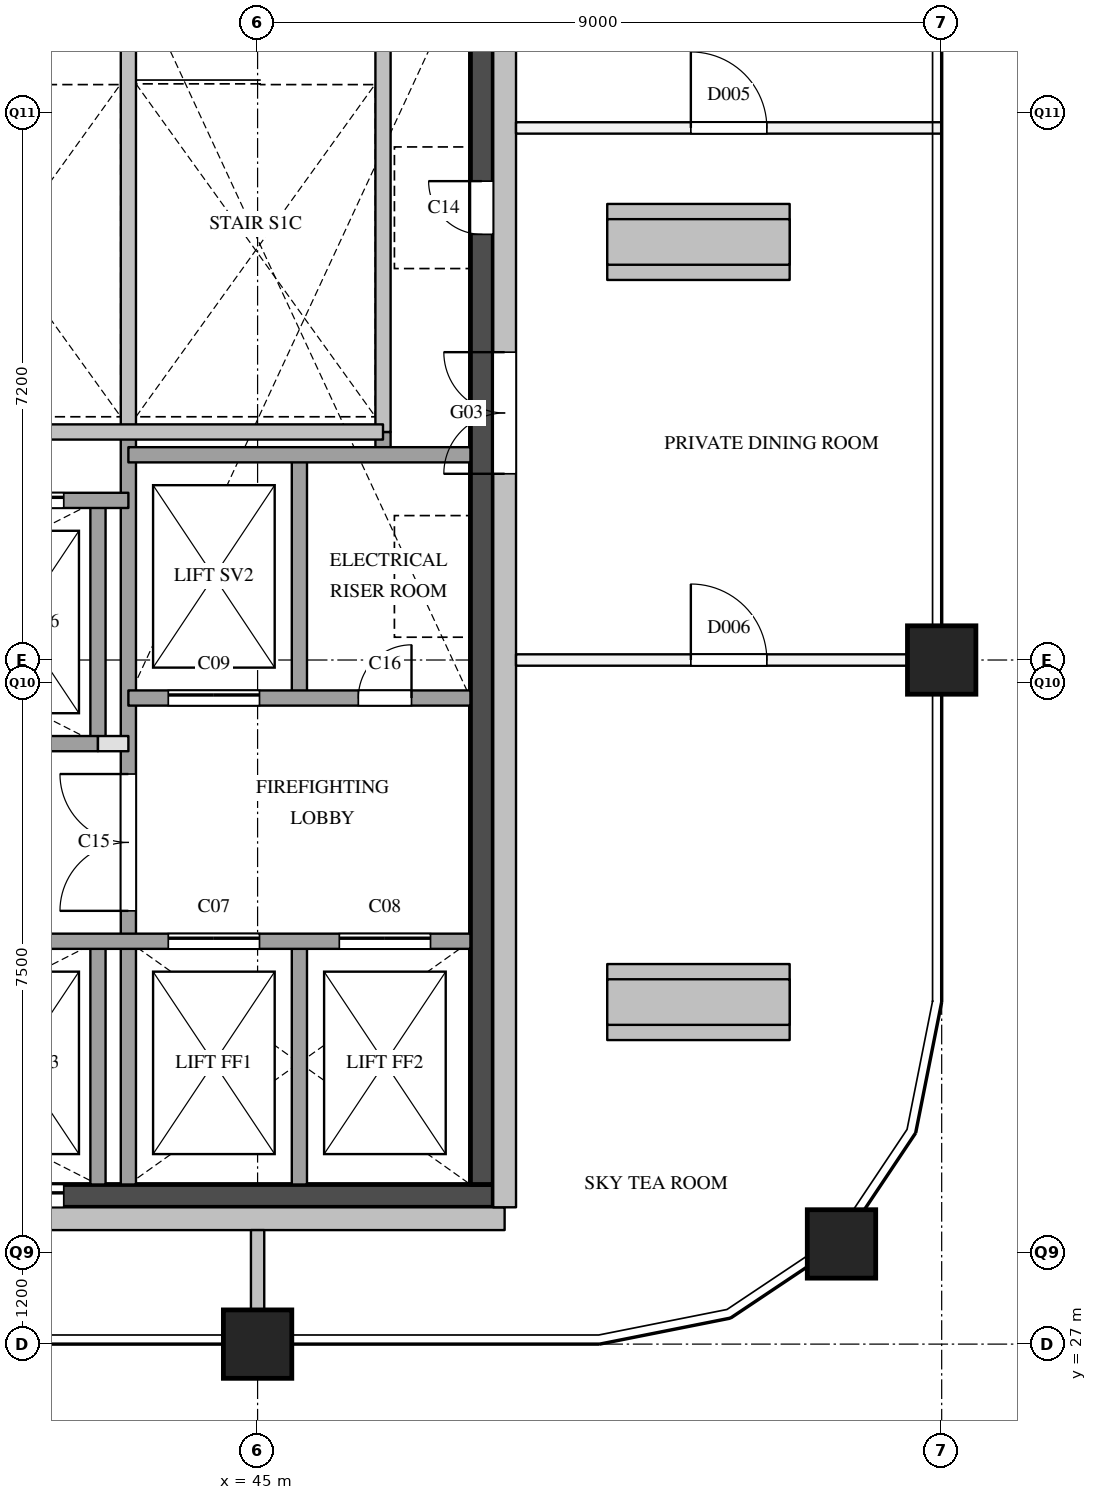
"""IFC4 building model, lengths in metres.
Left out: names, types, materials, properties, quantities, classifications, styles, units other than length and angle.
Written with IfcOpenShell. Run it as: python <this file> out.ifc"""

import sys

from ifc_helpers import new_model, si_unit, direction, frame, frame_2d, origin, origin_2d, place, context, subcontext, project, spatial, rectangle, extrude, element, fill, save


model = new_model("IFC4")
c1 = context("Model", 3, precision=1e-05, world=origin(), true_north=direction((0.0, 1.0)))
c2 = subcontext(c1, "Body", "Model", "MODEL_VIEW")
j1 = project(units=[si_unit("LENGTHUNIT", "METRE"), si_unit("PLANEANGLEUNIT", "RADIAN")], contexts=[c1])
p1 = place(None, origin())
s1 = spatial("IfcSite", under=j1, at=p1, CompositionType="ELEMENT")
p2 = place(p1, origin())
s2 = spatial("IfcBuilding", under=s1, at=p2, CompositionType="ELEMENT")
p3 = place(p2, frame((0.0, 0.0, 320.7)))
s3 = spatial("IfcBuildingStorey", under=s2, at=p3, CompositionType="ELEMENT", Elevation=320.7)
for number, where, z_axis, x_axis in (
    (1, (45.0, 27.0, 0.0), (0.0, 0.0, 1.0), (1.0, 0.0, 0.0)),
    (2, (52.682, 28.318, 0.0), (0.0, 0.0, 1.0), (1.0, 0.0, 0.0)),
    (3, (54.0, 36.0, 0.0), (0.0, 0.0, 1.0), (1.0, 0.0, 0.0)),
):
    element("IfcColumn", number, at=place(p3, frame(where, z_axis=z_axis, x_axis=x_axis)), inside=s3, PredefinedType="COLUMN", context=c2, shape_type="SweptSolid", body=[
        extrude(rectangle(XDim=0.9, YDim=0.9, at=origin_2d()), origin(), (0.0, 0.0, 1.0), 4.5),
    ])
p4 = place(p3, frame((49.6, 31.5, 4.5), z_axis=(0.0, 0.0, 1.0), x_axis=(1.0, 0.0, 0.0)))
e4 = element("IfcWall", 4, at=p4, inside=s3, PredefinedType="SOLIDWALL", context=c2, shape_type="SweptSolid", body=[
    extrude(rectangle(XDim=2.4, YDim=1.0, at=frame_2d((1.2, 0.0))), origin(), (0.0, 0.0, 1.0), 0.45),
])
p5 = place(p3, frame((49.6, 41.5, 4.5), z_axis=(0.0, 0.0, 1.0), x_axis=(1.0, 0.0, 0.0)))
e5 = element("IfcWall", 5, at=p5, inside=s3, PredefinedType="SOLIDWALL", context=c2, shape_type="SweptSolid", body=[
    extrude(rectangle(XDim=2.4, YDim=1.0, at=frame_2d((1.2, 0.0))), origin(), (0.0, 0.0, 1.0), 1.35),
])
p6 = place(p3, frame((36.15, 28.65, 4.5), z_axis=(0.0, 0.0, 1.0), x_axis=(1.0, 0.0, 0.0)))
e6 = element("IfcWall", 6, at=p6, inside=s3, PredefinedType="SOLIDWALL", context=c2, shape_type="SweptSolid", body=[
    extrude(rectangle(XDim=12.1, YDim=0.3, at=frame_2d((6.05, 0.0))), origin(), (0.0, 0.0, 1.0), 3.6),
])
p7 = place(p3, frame((48.25, 28.8, 4.5), z_axis=(0.0, 0.0, 1.0), x_axis=(0.0, 1.0, 0.0)))
e7 = element("IfcWall", 7, at=p7, inside=s3, PredefinedType="SOLIDWALL", context=c2, shape_type="SweptSolid", body=[
    extrude(rectangle(XDim=20.9, YDim=0.3, at=frame_2d((10.45, 0.0))), origin(), (0.0, 0.0, 1.0), 3.6),
])
p8 = place(p7, frame((9.65, 0.0, 0.0)))
e8 = element("IfcOpeningElement", 8, at=p8, cuts=e7, PredefinedType="OPENING", context=c2, shape_type="SweptSolid", body=[
    extrude(rectangle(XDim=1.6, YDim=2.4, at=frame_2d((0.8, 1.2))), frame((0.0, 0.16, 0.0), z_axis=(0.0, -1.0, 0.0), x_axis=(1.0, 0.0, 0.0)), (0.0, 0.0, 1.0), 0.32),
])
for number, where, z_axis, x_axis in (
    (9, (49.6, 31.5, 4.95), (0.0, 0.0, 1.0), (1.0, 0.0, 0.0)),
    (10, (49.6, 41.5, 5.85), (0.0, 0.0, 1.0), (1.0, 0.0, 0.0)),
):
    element("IfcWall", number, at=place(p3, frame(where, z_axis=z_axis, x_axis=x_axis)), inside=s3, PredefinedType="SOLIDWALL", context=c2, shape_type="SweptSolid", body=[
        extrude(rectangle(XDim=2.4, YDim=0.6, at=frame_2d((1.2, 0.0))), origin(), (0.0, 0.0, 1.0), 0.75),
    ])
p9 = place(p3, frame((36.3, 28.95, 0.0), z_axis=(0.0, 0.0, 1.0), x_axis=(1.0, 0.0, 0.0)))
e11 = element("IfcWall", 11, at=p9, inside=s3, PredefinedType="SHEAR", context=c2, shape_type="SweptSolid", body=[
    extrude(rectangle(XDim=11.8, YDim=0.3, at=frame_2d((5.9, 0.0))), origin(), (0.0, 0.0, 1.0), 3.95),
])
p10 = place(p9, frame((0.75, 0.0, 0.0)))
e12 = element("IfcOpeningElement", 12, at=p10, cuts=e11, PredefinedType="OPENING", context=c2, shape_type="SweptSolid", body=[
    extrude(rectangle(XDim=1.2, YDim=2.1, at=frame_2d((0.6, 1.05))), frame((0.0, 0.16, 0.0), z_axis=(0.0, -1.0, 0.0), x_axis=(1.0, 0.0, 0.0)), (0.0, 0.0, 1.0), 0.32),
])
p11 = place(p9, frame((2.85, 0.0, 0.0)))
e13 = element("IfcOpeningElement", 13, at=p11, cuts=e11, PredefinedType="OPENING", context=c2, shape_type="SweptSolid", body=[
    extrude(rectangle(XDim=1.2, YDim=2.1, at=frame_2d((0.6, 1.05))), frame((0.0, 0.16, 0.0), z_axis=(0.0, -1.0, 0.0), x_axis=(1.0, 0.0, 0.0)), (0.0, 0.0, 1.0), 0.32),
])
p12 = place(p9, frame((4.95, 0.0, 0.0)))
e14 = element("IfcOpeningElement", 14, at=p12, cuts=e11, PredefinedType="OPENING", context=c2, shape_type="SweptSolid", body=[
    extrude(rectangle(XDim=1.2, YDim=2.1, at=frame_2d((0.6, 1.05))), frame((0.0, 0.16, 0.0), z_axis=(0.0, -1.0, 0.0), x_axis=(1.0, 0.0, 0.0)), (0.0, 0.0, 1.0), 0.32),
])
p13 = place(p3, frame((47.95, 29.1, 0.0), z_axis=(0.0, 0.0, 1.0), x_axis=(0.0, 1.0, 0.0)))
e15 = element("IfcWall", 15, at=p13, inside=s3, PredefinedType="SHEAR", context=c2, shape_type="SweptSolid", body=[
    extrude(rectangle(XDim=20.3, YDim=0.3, at=frame_2d((10.15, 0.0))), origin(), (0.0, 0.0, 1.0), 3.95),
])
p14 = place(p13, frame((12.5, 0.0, 0.0)))
e16 = element("IfcOpeningElement", 16, at=p14, cuts=e15, PredefinedType="OPENING", context=c2, shape_type="SweptSolid", body=[
    extrude(rectangle(XDim=0.7, YDim=2.1, at=frame_2d((0.35, 1.05))), frame((0.0, 0.16, 0.0), z_axis=(0.0, -1.0, 0.0), x_axis=(1.0, 0.0, 0.0)), (0.0, 0.0, 1.0), 0.32),
])
p15 = place(p3, frame((42.9, 29.1, 0.0), z_axis=(0.0, 0.0, 1.0), x_axis=(0.0, 1.0, 0.0)))
e17 = element("IfcWall", 17, at=p15, inside=s3, PredefinedType="SOLIDWALL", context=c2, shape_type="SweptSolid", body=[
    extrude(rectangle(XDim=3.2, YDim=0.2, at=frame_2d((1.6, 0.0))), origin(), (0.0, 0.0, 1.0), 3.95),
])
p16 = place(p3, frame((42.9, 34.9, 0.0), z_axis=(0.0, 0.0, 1.0), x_axis=(0.0, 1.0, 0.0)))
e18 = element("IfcWall", 18, at=p16, inside=s3, PredefinedType="SOLIDWALL", context=c2, shape_type="SweptSolid", body=[
    extrude(rectangle(XDim=3.2, YDim=0.2, at=frame_2d((1.6, 0.0))), origin(), (0.0, 0.0, 1.0), 3.95),
])
p17 = place(p3, frame((43.3, 29.1, 0.0), z_axis=(0.0, 0.0, 1.0), x_axis=(0.0, 1.0, 0.0)))
e19 = element("IfcWall", 19, at=p17, inside=s3, PredefinedType="SOLIDWALL", context=c2, shape_type="SweptSolid", body=[
    extrude(rectangle(XDim=9.9, YDim=0.2, at=frame_2d((4.95, 0.0))), origin(), (0.0, 0.0, 1.0), 3.95),
])
p18 = place(p17, frame((3.6, 0.0, 0.0)))
e20 = element("IfcOpeningElement", 20, at=p18, cuts=e19, PredefinedType="OPENING", context=c2, shape_type="SweptSolid", body=[
    extrude(rectangle(XDim=1.8, YDim=2.1, at=frame_2d((0.9, 1.05))), frame((0.0, 0.11, 0.0), z_axis=(0.0, -1.0, 0.0), x_axis=(1.0, 0.0, 0.0)), (0.0, 0.0, 1.0), 0.22),
])
p19 = place(p3, frame((43.3, 39.0, 0.0), z_axis=(0.0, 0.0, 1.0), x_axis=(0.0, 1.0, 0.0)))
e21 = element("IfcWall", 21, at=p19, inside=s3, PredefinedType="SOLIDWALL", context=c2, shape_type="SweptSolid", body=[
    extrude(rectangle(XDim=6.2, YDim=0.2, at=frame_2d((3.1, 0.0))), origin(), (0.0, 0.0, 1.0), 3.95),
])
for number, where, z_axis, x_axis in (
    (22, (45.55, 29.1, 0.0), (0.0, 0.0, 1.0), (0.0, 1.0, 0.0)),
    (23, (45.55, 35.5, 0.0), (0.0, 0.0, 1.0), (0.0, 1.0, 0.0)),
):
    element("IfcWall", number, at=place(p3, frame(where, z_axis=z_axis, x_axis=x_axis)), inside=s3, PredefinedType="SOLIDWALL", context=c2, shape_type="SweptSolid", body=[
        extrude(rectangle(XDim=3.2, YDim=0.2, at=frame_2d((1.6, 0.0))), origin(), (0.0, 0.0, 1.0), 3.95),
    ])
p20 = place(p3, frame((46.65, 38.7, 0.0), z_axis=(0.0, 0.0, 1.0), x_axis=(0.0, 1.0, 0.0)))
e24 = element("IfcWall", 24, at=p20, inside=s3, PredefinedType="SOLIDWALL", context=c2, shape_type="SweptSolid", body=[
    extrude(rectangle(XDim=0.3, YDim=0.2, at=frame_2d((0.15, 0.0))), origin(), (0.0, 0.0, 1.0), 3.95),
])
p21 = place(p3, frame((46.65, 39.0, 0.0), z_axis=(0.0, 0.0, 1.0), x_axis=(0.0, 1.0, 0.0)))
e25 = element("IfcWall", 25, at=p21, inside=s3, PredefinedType="SOLIDWALL", context=c2, shape_type="SweptSolid", body=[
    extrude(rectangle(XDim=6.2, YDim=0.2, at=frame_2d((3.1, 0.0))), origin(), (0.0, 0.0, 1.0), 3.95),
])
p22 = place(p3, frame((36.6, 32.3, 0.0), z_axis=(0.0, 0.0, 1.0), x_axis=(1.0, 0.0, 0.0)))
e26 = element("IfcWall", 26, at=p22, inside=s3, PredefinedType="SOLIDWALL", context=c2, shape_type="SweptSolid", body=[
    extrude(rectangle(XDim=11.2, YDim=0.2, at=frame_2d((5.6, 0.0))), origin(), (0.0, 0.0, 1.0), 3.95),
])
p23 = place(p22, frame((7.225, 0.0, 0.0)))
e27 = element("IfcOpeningElement", 27, at=p23, cuts=e26, PredefinedType="OPENING", context=c2, shape_type="SweptSolid", body=[
    extrude(rectangle(XDim=1.2, YDim=2.1, at=frame_2d((0.6, 1.05))), frame((0.0, 0.11, 0.0), z_axis=(0.0, -1.0, 0.0), x_axis=(1.0, 0.0, 0.0)), (0.0, 0.0, 1.0), 0.22),
])
p24 = place(p22, frame((9.475, 0.0, 0.0)))
e28 = element("IfcOpeningElement", 28, at=p24, cuts=e26, PredefinedType="OPENING", context=c2, shape_type="SweptSolid", body=[
    extrude(rectangle(XDim=1.2, YDim=2.1, at=frame_2d((0.6, 1.05))), frame((0.0, 0.11, 0.0), z_axis=(0.0, -1.0, 0.0), x_axis=(1.0, 0.0, 0.0)), (0.0, 0.0, 1.0), 0.22),
])
p25 = place(p3, frame((42.9, 34.9, 0.0), z_axis=(0.0, 0.0, 1.0), x_axis=(1.0, 0.0, 0.0)))
e29 = element("IfcWall", 29, at=p25, inside=s3, PredefinedType="PARTITIONING", context=c2, shape_type="SweptSolid", body=[
    extrude(rectangle(XDim=0.4, YDim=0.2, at=frame_2d((0.2, 0.0))), origin(), (0.0, 0.0, 1.0), 3.95),
])
p26 = place(p3, frame((36.6, 34.9, 0.0), z_axis=(0.0, 0.0, 1.0), x_axis=(1.0, 0.0, 0.0)))
e30 = element("IfcWall", 30, at=p26, inside=s3, PredefinedType="SOLIDWALL", context=c2, shape_type="SweptSolid", body=[
    extrude(rectangle(XDim=6.3, YDim=0.2, at=frame_2d((3.15, 0.0))), origin(), (0.0, 0.0, 1.0), 3.95),
])
p27 = place(p3, frame((43.3, 35.5, 0.0), z_axis=(0.0, 0.0, 1.0), x_axis=(1.0, 0.0, 0.0)))
e31 = element("IfcWall", 31, at=p27, inside=s3, PredefinedType="SOLIDWALL", context=c2, shape_type="SweptSolid", body=[
    extrude(rectangle(XDim=4.5, YDim=0.2, at=frame_2d((2.25, 0.0))), origin(), (0.0, 0.0, 1.0), 3.95),
])
p28 = place(p27, frame((0.525, 0.0, 0.0)))
e32 = element("IfcOpeningElement", 32, at=p28, cuts=e31, PredefinedType="OPENING", context=c2, shape_type="SweptSolid", body=[
    extrude(rectangle(XDim=1.2, YDim=2.1, at=frame_2d((0.6, 1.05))), frame((0.0, 0.11, 0.0), z_axis=(0.0, -1.0, 0.0), x_axis=(1.0, 0.0, 0.0)), (0.0, 0.0, 1.0), 0.22),
])
p29 = place(p27, frame((3.025, 0.0, 0.0)))
e33 = element("IfcOpeningElement", 33, at=p29, cuts=e31, PredefinedType="OPENING", context=c2, shape_type="SweptSolid", body=[
    extrude(rectangle(XDim=0.7, YDim=2.1, at=frame_2d((0.35, 1.05))), frame((0.0, 0.11, 0.0), z_axis=(0.0, -1.0, 0.0), x_axis=(1.0, 0.0, 0.0)), (0.0, 0.0, 1.0), 0.22),
])
p30 = place(p3, frame((36.6, 38.1, 0.0), z_axis=(0.0, 0.0, 1.0), x_axis=(1.0, 0.0, 0.0)))
e34 = element("IfcWall", 34, at=p30, inside=s3, PredefinedType="SOLIDWALL", context=c2, shape_type="SweptSolid", body=[
    extrude(rectangle(XDim=6.7, YDim=0.2, at=frame_2d((3.35, 0.0))), origin(), (0.0, 0.0, 1.0), 3.95),
])
p31 = place(p30, frame((0.45, 0.0, 0.0)))
e35 = element("IfcOpeningElement", 35, at=p31, cuts=e34, PredefinedType="OPENING", context=c2, shape_type="SweptSolid", body=[
    extrude(rectangle(XDim=1.2, YDim=2.1, at=frame_2d((0.6, 1.05))), frame((0.0, 0.11, 0.0), z_axis=(0.0, -1.0, 0.0), x_axis=(1.0, 0.0, 0.0)), (0.0, 0.0, 1.0), 0.22),
])
p32 = place(p30, frame((2.55, 0.0, 0.0)))
e36 = element("IfcOpeningElement", 36, at=p32, cuts=e34, PredefinedType="OPENING", context=c2, shape_type="SweptSolid", body=[
    extrude(rectangle(XDim=1.2, YDim=2.1, at=frame_2d((0.6, 1.05))), frame((0.0, 0.11, 0.0), z_axis=(0.0, -1.0, 0.0), x_axis=(1.0, 0.0, 0.0)), (0.0, 0.0, 1.0), 0.22),
])
p33 = place(p30, frame((4.65, 0.0, 0.0)))
e37 = element("IfcOpeningElement", 37, at=p33, cuts=e34, PredefinedType="OPENING", context=c2, shape_type="SweptSolid", body=[
    extrude(rectangle(XDim=1.2, YDim=2.1, at=frame_2d((0.6, 1.05))), frame((0.0, 0.11, 0.0), z_axis=(0.0, -1.0, 0.0), x_axis=(1.0, 0.0, 0.0)), (0.0, 0.0, 1.0), 0.22),
])
p34 = place(p3, frame((43.3, 38.7, 0.0), z_axis=(0.0, 0.0, 1.0), x_axis=(1.0, 0.0, 0.0)))
e38 = element("IfcWall", 38, at=p34, inside=s3, PredefinedType="SOLIDWALL", context=c2, shape_type="SweptSolid", body=[
    extrude(rectangle(XDim=4.5, YDim=0.2, at=frame_2d((2.25, 0.0))), origin(), (0.0, 0.0, 1.0), 3.95),
])
p35 = place(p3, frame((36.6, 39.0, 0.0), z_axis=(0.0, 0.0, 1.0), x_axis=(1.0, 0.0, 0.0)))
e39 = element("IfcWall", 39, at=p35, inside=s3, PredefinedType="SOLIDWALL", context=c2, shape_type="SweptSolid", body=[
    extrude(rectangle(XDim=10.05, YDim=0.2, at=frame_2d((5.025, 0.0))), origin(), (0.0, 0.0, 1.0), 3.95),
])
p36 = place(p3, frame((45.0, 27.0, 0.0), z_axis=(0.0, 0.0, 1.0), x_axis=(0.0, 1.0, 0.0)))
e40 = element("IfcWall", 40, at=p36, inside=s3, PredefinedType="PARTITIONING", context=c2, shape_type="SweptSolid", body=[
    extrude(rectangle(XDim=1.5, YDim=0.175, at=frame_2d((0.75, 0.0))), origin(), (0.0, 0.0, 1.0), 3.95),
])
p37 = place(p3, frame((48.4, 36.0, 0.0), z_axis=(0.0, 0.0, 1.0), x_axis=(1.0, 0.0, 0.0)))
e41 = element("IfcWall", 41, at=p37, inside=s3, PredefinedType="PARTITIONING", context=c2, shape_type="SweptSolid", body=[
    extrude(rectangle(XDim=5.6, YDim=0.15, at=frame_2d((2.8, 0.0))), origin(), (0.0, 0.0, 1.0), 3.95),
])
p38 = place(p37, frame((2.3, 0.0, 0.0)))
e42 = element("IfcOpeningElement", 42, at=p38, cuts=e41, PredefinedType="OPENING", context=c2, shape_type="SweptSolid", body=[
    extrude(rectangle(XDim=1.0, YDim=2.1, at=frame_2d((0.5, 1.05))), frame((0.0, 0.085, 0.0), z_axis=(0.0, -1.0, 0.0), x_axis=(1.0, 0.0, 0.0)), (0.0, 0.0, 1.0), 0.17),
])
p39 = place(p3, frame((48.4, 43.0, 0.0), z_axis=(0.0, 0.0, 1.0), x_axis=(1.0, 0.0, 0.0)))
e43 = element("IfcWall", 43, at=p39, inside=s3, PredefinedType="PARTITIONING", context=c2, shape_type="SweptSolid", body=[
    extrude(rectangle(XDim=5.6, YDim=0.15, at=frame_2d((2.8, 0.0))), origin(), (0.0, 0.0, 1.0), 2.95),
])
p40 = place(p39, frame((2.3, 0.0, 0.0)))
e44 = element("IfcOpeningElement", 44, at=p40, cuts=e43, PredefinedType="OPENING", context=c2, shape_type="SweptSolid", body=[
    extrude(rectangle(XDim=1.0, YDim=2.1, at=frame_2d((0.5, 1.05))), frame((0.0, 0.085, 0.0), z_axis=(0.0, -1.0, 0.0), x_axis=(1.0, 0.0, 0.0)), (0.0, 0.0, 1.0), 0.17),
])
p41 = place(p8, origin())
e45 = element("IfcDoor", 45, at=p41, inside=s3, OperationType="DOUBLE_DOOR_SINGLE_SWING", PredefinedType="DOOR", context=c2, shape_type="SweptSolid", body=[
    extrude(rectangle(XDim=1.6, YDim=2.4, at=frame_2d((0.8, 1.2))), frame((0.0, 0.025, 0.0), z_axis=(0.0, -1.0, 0.0), x_axis=(1.0, 0.0, 0.0)), (0.0, 0.0, 1.0), 0.05),
])
fill(e8, e45)
p42 = place(p12, origin())
e46 = element("IfcDoor", 46, at=p42, inside=s3, OperationType="SLIDING_TO_LEFT", PredefinedType="DOOR", context=c2, shape_type="SweptSolid", body=[
    extrude(rectangle(XDim=1.2, YDim=2.1, at=frame_2d((0.6, 1.05))), frame((0.0, 0.025, 0.0), z_axis=(0.0, -1.0, 0.0), x_axis=(1.0, 0.0, 0.0)), (0.0, 0.0, 1.0), 0.05),
])
fill(e14, e46)
p43 = place(p33, origin())
e47 = element("IfcDoor", 47, at=p43, inside=s3, OperationType="SLIDING_TO_LEFT", PredefinedType="DOOR", context=c2, shape_type="SweptSolid", body=[
    extrude(rectangle(XDim=1.2, YDim=2.1, at=frame_2d((0.6, 1.05))), frame((0.0, 0.025, 0.0), z_axis=(0.0, -1.0, 0.0), x_axis=(1.0, 0.0, 0.0)), (0.0, 0.0, 1.0), 0.05),
])
fill(e37, e47)
p44 = place(p23, origin())
e48 = element("IfcDoor", 48, at=p44, inside=s3, OperationType="SLIDING_TO_LEFT", PredefinedType="DOOR", context=c2, shape_type="SweptSolid", body=[
    extrude(rectangle(XDim=1.2, YDim=2.1, at=frame_2d((0.6, 1.05))), frame((0.0, 0.025, 0.0), z_axis=(0.0, -1.0, 0.0), x_axis=(1.0, 0.0, 0.0)), (0.0, 0.0, 1.0), 0.05),
])
fill(e27, e48)
p45 = place(p24, origin())
e49 = element("IfcDoor", 49, at=p45, inside=s3, OperationType="SLIDING_TO_LEFT", PredefinedType="DOOR", context=c2, shape_type="SweptSolid", body=[
    extrude(rectangle(XDim=1.2, YDim=2.1, at=frame_2d((0.6, 1.05))), frame((0.0, 0.025, 0.0), z_axis=(0.0, -1.0, 0.0), x_axis=(1.0, 0.0, 0.0)), (0.0, 0.0, 1.0), 0.05),
])
fill(e28, e49)
p46 = place(p28, origin())
e50 = element("IfcDoor", 50, at=p46, inside=s3, OperationType="SLIDING_TO_LEFT", PredefinedType="DOOR", context=c2, shape_type="SweptSolid", body=[
    extrude(rectangle(XDim=1.2, YDim=2.1, at=frame_2d((0.6, 1.05))), frame((0.0, 0.025, 0.0), z_axis=(0.0, -1.0, 0.0), x_axis=(1.0, 0.0, 0.0)), (0.0, 0.0, 1.0), 0.05),
])
fill(e32, e50)
p47 = place(p14, origin())
e51 = element("IfcDoor", 51, at=p47, inside=s3, OperationType="SINGLE_SWING_RIGHT", PredefinedType="DOOR", context=c2, shape_type="SweptSolid", body=[
    extrude(rectangle(XDim=0.7, YDim=2.1, at=frame_2d((0.35, 1.05))), frame((0.0, 0.025, 0.0), z_axis=(0.0, -1.0, 0.0), x_axis=(1.0, 0.0, 0.0)), (0.0, 0.0, 1.0), 0.05),
])
fill(e16, e51)
p48 = place(p18, origin())
e52 = element("IfcDoor", 52, at=p48, inside=s3, OperationType="DOUBLE_DOOR_SINGLE_SWING", PredefinedType="DOOR", context=c2, shape_type="SweptSolid", body=[
    extrude(rectangle(XDim=1.8, YDim=2.1, at=frame_2d((0.9, 1.05))), frame((0.0, 0.025, 0.0), z_axis=(0.0, -1.0, 0.0), x_axis=(1.0, 0.0, 0.0)), (0.0, 0.0, 1.0), 0.05),
])
fill(e20, e52)
p49 = place(p29, origin())
e53 = element("IfcDoor", 53, at=p49, inside=s3, OperationType="SINGLE_SWING_RIGHT", PredefinedType="DOOR", context=c2, shape_type="SweptSolid", body=[
    extrude(rectangle(XDim=0.7, YDim=2.1, at=frame_2d((0.35, 1.05))), frame((0.0, 0.025, 0.0), z_axis=(0.0, -1.0, 0.0), x_axis=(1.0, 0.0, 0.0)), (0.0, 0.0, 1.0), 0.05),
])
fill(e33, e53)
p50 = place(p40, origin())
e54 = element("IfcDoor", 54, at=p50, inside=s3, OperationType="SINGLE_SWING_LEFT", PredefinedType="DOOR", context=c2, shape_type="SweptSolid", body=[
    extrude(rectangle(XDim=1.0, YDim=2.1, at=frame_2d((0.5, 1.05))), frame((0.0, 0.025, 0.0), z_axis=(0.0, -1.0, 0.0), x_axis=(1.0, 0.0, 0.0)), (0.0, 0.0, 1.0), 0.05),
])
fill(e44, e54)
p51 = place(p38, origin())
e55 = element("IfcDoor", 55, at=p51, inside=s3, OperationType="SINGLE_SWING_LEFT", PredefinedType="DOOR", context=c2, shape_type="SweptSolid", body=[
    extrude(rectangle(XDim=1.0, YDim=2.1, at=frame_2d((0.5, 1.05))), frame((0.0, 0.025, 0.0), z_axis=(0.0, -1.0, 0.0), x_axis=(1.0, 0.0, 0.0)), (0.0, 0.0, 1.0), 0.05),
])
fill(e42, e55)
save(model, sys.argv[1])
